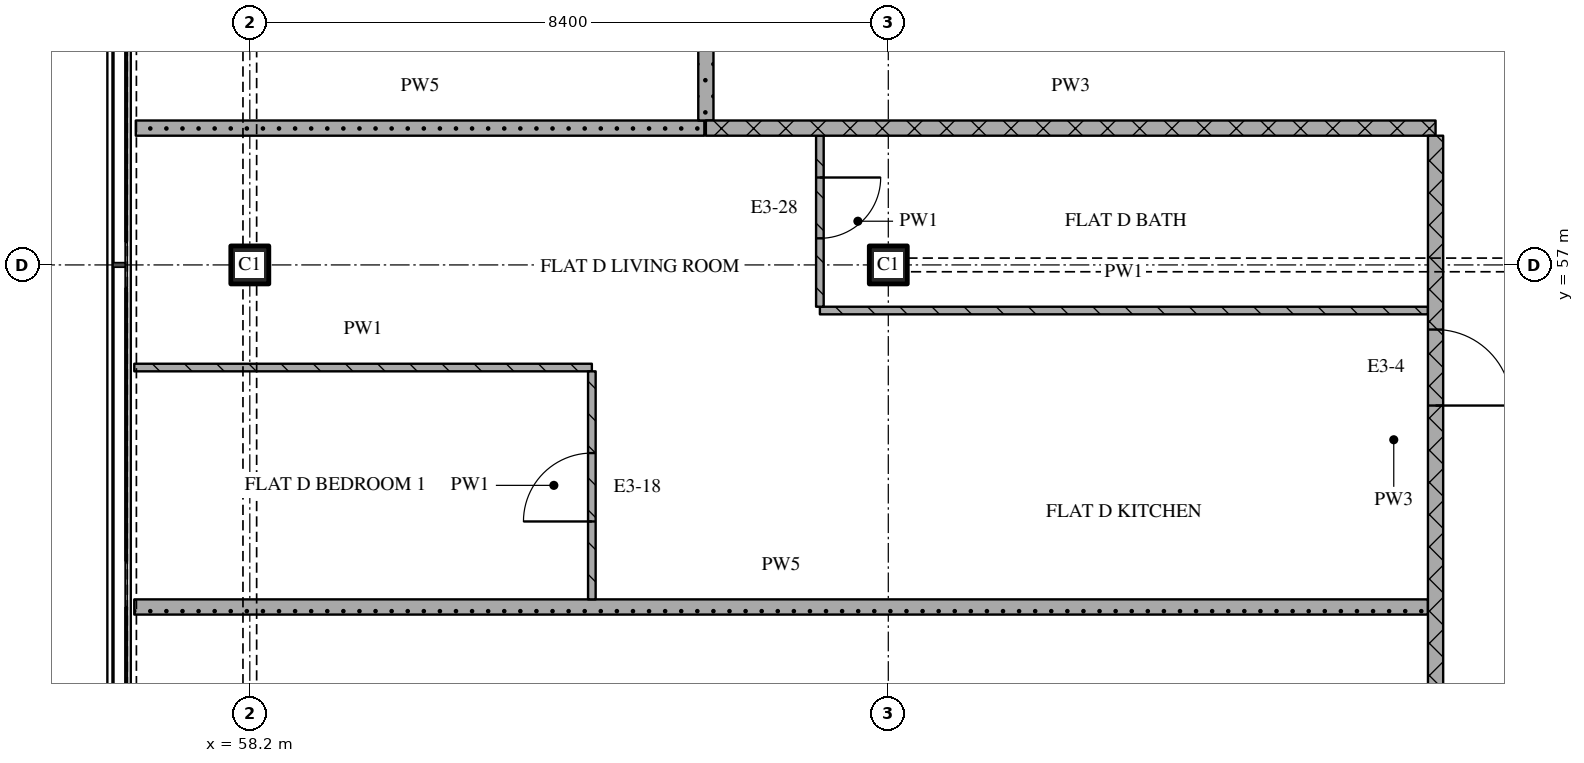
"""IFC4 building model, lengths in metres.
Left out: names, types, materials, properties, quantities, classifications, styles, units other than length and angle.
Written with IfcOpenShell. Run it as: python <this file> out.ifc"""

import sys

from ifc_helpers import new_model, si_unit, direction, frame, frame_2d, origin, origin_2d, place, context, subcontext, project, spatial, rectangle, extrude, element, fill, save


model = new_model("IFC4")
c1 = context("Model", 3, precision=1e-05, world=origin(), true_north=direction((0.0, 1.0)))
c2 = subcontext(c1, "Body", "Model", "MODEL_VIEW")
j1 = project(units=[si_unit("LENGTHUNIT", "METRE"), si_unit("PLANEANGLEUNIT", "RADIAN")], contexts=[c1])
p1 = place(None, origin())
s1 = spatial("IfcSite", under=j1, at=p1, CompositionType="ELEMENT")
p2 = place(p1, origin())
s2 = spatial("IfcBuilding", under=s1, at=p2, CompositionType="ELEMENT")
p3 = place(p2, frame((0.0, 0.0, 274.35)))
s3 = spatial("IfcBuildingStorey", under=s2, at=p3, CompositionType="ELEMENT", Elevation=274.35)
for number, where, z_axis, x_axis in (
    (1, (58.2, 57.0, 0.0), (0.0, 0.0, 1.0), (1.0, 0.0, 0.0)),
    (2, (66.6, 57.0, 0.0), (0.0, 0.0, 1.0), (1.0, 0.0, 0.0)),
):
    element("IfcColumn", number, at=place(p3, frame(where, z_axis=z_axis, x_axis=x_axis)), inside=s3, PredefinedType="COLUMN", context=c2, shape_type="SweptSolid", body=[
        extrude(rectangle(XDim=0.5, YDim=0.5, at=origin_2d()), origin(), (0.0, 0.0, 1.0), 3.6),
    ])
p4 = place(p3, frame((56.68, 52.5, 0.0), z_axis=(0.0, 0.0, 1.0), x_axis=(1.0, 0.0, 0.0)))
e3 = element("IfcWall", 3, at=p4, inside=s3, PredefinedType="PARTITIONING", context=c2, shape_type="SweptSolid", body=[
    extrude(rectangle(XDim=17.02, YDim=0.2, at=frame_2d((8.51, 0.0))), origin(), (0.0, 0.0, 1.0), 3.32),
])
p5 = place(p3, frame((56.68, 55.65, 0.0), z_axis=(0.0, 0.0, 1.0), x_axis=(1.0, 0.0, 0.0)))
e4 = element("IfcWall", 4, at=p5, inside=s3, PredefinedType="PARTITIONING", context=c2, shape_type="SweptSolid", body=[
    extrude(rectangle(XDim=6.02, YDim=0.1, at=frame_2d((3.01, 0.0))), origin(), (0.0, 0.0, 1.0), 3.32),
])
p6 = place(p3, frame((65.7, 56.4, 0.0), z_axis=(0.0, 0.0, 1.0), x_axis=(1.0, 0.0, 0.0)))
e5 = element("IfcWall", 5, at=p6, inside=s3, PredefinedType="PARTITIONING", context=c2, shape_type="SweptSolid", body=[
    extrude(rectangle(XDim=8.0, YDim=0.1, at=frame_2d((4.0, 0.0))), origin(), (0.0, 0.0, 1.0), 3.32),
])
p7 = place(p3, frame((64.2, 58.8, 0.0), z_axis=(0.0, 0.0, 1.0), x_axis=(1.0, 0.0, 0.0)))
e6 = element("IfcWall", 6, at=p7, inside=s3, PredefinedType="PARTITIONING", context=c2, shape_type="SweptSolid", body=[
    extrude(rectangle(XDim=9.6, YDim=0.2, at=frame_2d((4.8, 0.0))), origin(), (0.0, 0.0, 1.0), 3.32),
])
p8 = place(p3, frame((56.7, 58.8, 0.0), z_axis=(0.0, 0.0, 1.0), x_axis=(1.0, 0.0, 0.0)))
e7 = element("IfcWall", 7, at=p8, inside=s3, PredefinedType="PARTITIONING", context=c2, shape_type="SweptSolid", body=[
    extrude(rectangle(XDim=7.48, YDim=0.2, at=frame_2d((3.74, 0.0))), origin(), (0.0, 0.0, 1.0), 3.32),
])
p9 = place(p3, frame((62.7, 52.6, 0.0), z_axis=(0.0, 0.0, 1.0), x_axis=(0.0, 1.0, 0.0)))
e8 = element("IfcWall", 8, at=p9, inside=s3, PredefinedType="PARTITIONING", context=c2, shape_type="SweptSolid", body=[
    extrude(rectangle(XDim=3.0, YDim=0.1, at=frame_2d((1.5, 0.0))), origin(), (0.0, 0.0, 1.0), 3.32),
])
p10 = place(p9, frame((1.025, 0.0, 0.0)))
e9 = element("IfcOpeningElement", 9, at=p10, cuts=e8, PredefinedType="OPENING", context=c2, shape_type="SweptSolid", body=[
    extrude(rectangle(XDim=0.9, YDim=2.1, at=frame_2d((0.45, 1.05))), frame((0.0, 0.06, 0.0), z_axis=(0.0, -1.0, 0.0), x_axis=(1.0, 0.0, 0.0)), (0.0, 0.0, 1.0), 0.12),
])
p11 = place(p3, frame((64.2, 61.1, 0.0), z_axis=(0.0, 0.0, 1.0), x_axis=(0.0, -1.0, 0.0)))
e10 = element("IfcWall", 10, at=p11, inside=s3, PredefinedType="PARTITIONING", context=c2, shape_type="SweptSolid", body=[
    extrude(rectangle(XDim=2.2, YDim=0.2, at=frame_2d((1.1, 0.0))), origin(), (0.0, 0.0, 1.0), 3.32),
])
p12 = place(p3, frame((65.7, 58.7, 0.0), z_axis=(0.0, 0.0, 1.0), x_axis=(0.0, -1.0, 0.0)))
e11 = element("IfcWall", 11, at=p12, inside=s3, PredefinedType="PARTITIONING", context=c2, shape_type="SweptSolid", body=[
    extrude(rectangle(XDim=2.25, YDim=0.1, at=frame_2d((1.125, 0.0))), origin(), (0.0, 0.0, 1.0), 3.32),
])
p13 = place(p12, frame((0.55, 0.0, 0.0)))
e12 = element("IfcOpeningElement", 12, at=p13, cuts=e11, PredefinedType="OPENING", context=c2, shape_type="SweptSolid", body=[
    extrude(rectangle(XDim=0.8, YDim=2.1, at=frame_2d((0.4, 1.05))), frame((0.0, 0.06, 0.0), z_axis=(0.0, -1.0, 0.0), x_axis=(1.0, 0.0, 0.0)), (0.0, 0.0, 1.0), 0.12),
])
p14 = place(p3, frame((73.8, 50.7, 0.0), z_axis=(0.0, 0.0, 1.0), x_axis=(0.0, 1.0, 0.0)))
e13 = element("IfcWall", 13, at=p14, inside=s3, PredefinedType="PARTITIONING", context=c2, shape_type="SweptSolid", body=[
    extrude(rectangle(XDim=8.0, YDim=0.2, at=frame_2d((4.0, 0.0))), origin(), (0.0, 0.0, 1.0), 3.32),
])
p15 = place(p14, frame((4.45, 0.0, 0.0)))
e14 = element("IfcOpeningElement", 14, at=p15, cuts=e13, PredefinedType="OPENING", context=c2, shape_type="SweptSolid", body=[
    extrude(rectangle(XDim=1.0, YDim=2.1, at=frame_2d((0.5, 1.05))), frame((0.0, 0.11, 0.0), z_axis=(0.0, -1.0, 0.0), x_axis=(1.0, 0.0, 0.0)), (0.0, 0.0, 1.0), 0.22),
])
p16 = place(p10, origin())
e15 = element("IfcDoor", 15, at=p16, inside=s3, OperationType="SINGLE_SWING_LEFT", PredefinedType="DOOR", context=c2, shape_type="SweptSolid", body=[
    extrude(rectangle(XDim=0.9, YDim=2.1, at=frame_2d((0.45, 1.05))), frame((0.0, 0.025, 0.0), z_axis=(0.0, -1.0, 0.0), x_axis=(1.0, 0.0, 0.0)), (0.0, 0.0, 1.0), 0.05),
])
fill(e9, e15)
p17 = place(p13, origin())
e16 = element("IfcDoor", 16, at=p17, inside=s3, OperationType="SINGLE_SWING_LEFT", PredefinedType="DOOR", context=c2, shape_type="SweptSolid", body=[
    extrude(rectangle(XDim=0.8, YDim=2.1, at=frame_2d((0.4, 1.05))), frame((0.0, 0.025, 0.0), z_axis=(0.0, -1.0, 0.0), x_axis=(1.0, 0.0, 0.0)), (0.0, 0.0, 1.0), 0.05),
])
fill(e12, e16)
p18 = place(p15, origin())
e17 = element("IfcDoor", 17, at=p18, inside=s3, OperationType="SINGLE_SWING_RIGHT", PredefinedType="DOOR", context=c2, shape_type="SweptSolid", body=[
    extrude(rectangle(XDim=1.0, YDim=2.1, at=frame_2d((0.5, 1.05))), frame((0.0, 0.025, 0.0), z_axis=(0.0, -1.0, 0.0), x_axis=(1.0, 0.0, 0.0)), (0.0, 0.0, 1.0), 0.05),
])
fill(e14, e17)
save(model, sys.argv[1])
